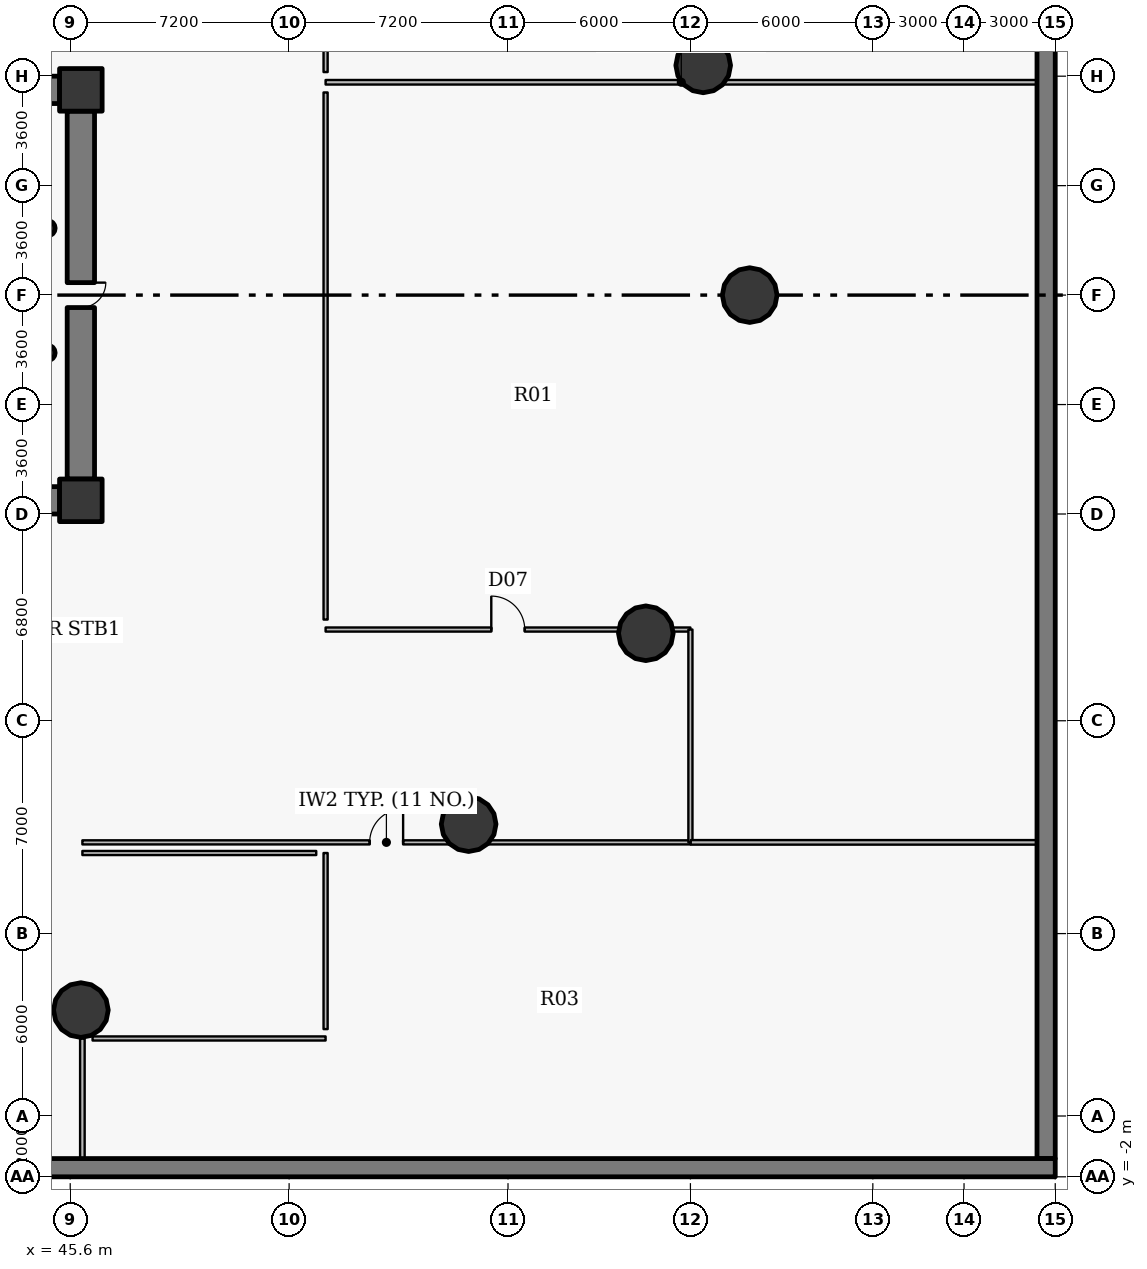
"""IFC4 building model, lengths in metres.
Left out: names, types, materials, properties, quantities, classifications, styles, units other than length and angle.
Written with IfcOpenShell. Run it as: python <this file> out.ifc"""

import sys

from ifc_helpers import new_model, si_unit, direction, frame, frame_2d, origin, origin_2d, place, context, subcontext, project, spatial, rectangle, hollow_circle, extrude, source, transform, mapped, element, fill, save


model = new_model("IFC4")
c1 = context("Model", 3, precision=1e-05, world=origin(), true_north=direction((0.0, 1.0)))
c2 = subcontext(c1, "Body", "Model", "MODEL_VIEW")
j1 = project(units=[si_unit("LENGTHUNIT", "METRE"), si_unit("PLANEANGLEUNIT", "RADIAN")], contexts=[c1])
p1 = place(None, origin())
s1 = spatial("IfcSite", under=j1, at=p1, CompositionType="ELEMENT")
p2 = place(p1, origin())
s2 = spatial("IfcBuilding", under=s1, at=p2, CompositionType="ELEMENT")
p3 = place(p2, frame((0.0, 0.0, -9.0)))
s3 = spatial("IfcBuildingStorey", under=s2, at=p3, CompositionType="ELEMENT", Elevation=-9.0)
p4 = place(p3, frame((77.7, 55.4, 0.0), z_axis=(0.0, 0.0, 1.0), x_axis=(0.0, -1.0, 0.0)))
e1 = element("IfcWall", 1, at=p4, inside=s3, PredefinedType="SHEAR", context=c2, shape_type="SweptSolid", body=[
    extrude(rectangle(XDim=56.8, YDim=0.6, at=frame_2d((28.4, 0.0))), origin(), (0.0, 0.0, 1.0), 4.2),
])
p5 = place(p3, frame((78.0, -1.7, 0.0), z_axis=(0.0, 0.0, 1.0), x_axis=(-1.0, 0.0, 0.0)))
e2 = element("IfcWall", 2, at=p5, inside=s3, PredefinedType="SHEAR", context=c2, shape_type="SweptSolid", body=[
    extrude(rectangle(XDim=84.0, YDim=0.6, at=frame_2d((42.0, 0.0))), origin(), (0.0, 0.0, 1.0), 4.2),
])
for number, where, z_axis, x_axis in (
    (3, (45.95, 20.25, 0.0), (0.0, 0.0, 1.0), (1.0, 0.0, 0.0)),
    (4, (45.95, 33.75, 0.0), (0.0, 0.0, 1.0), (1.0, 0.0, 0.0)),
):
    element("IfcColumn", number, at=place(p3, frame(where, z_axis=z_axis, x_axis=x_axis)), inside=s3, PredefinedType="COLUMN", context=c2, shape_type="SweptSolid", body=[
        extrude(rectangle(XDim=1.4, YDim=1.4, at=origin_2d()), origin(), (0.0, 0.0, 1.0), 4.5),
    ])
p6 = place(p3, frame((26.75, 33.75, 0.0), z_axis=(0.0, 0.0, 1.0), x_axis=(1.0, 0.0, 0.0)))
e5 = element("IfcWall", 5, at=p6, inside=s3, PredefinedType="SHEAR", context=c2, shape_type="SweptSolid", body=[
    extrude(rectangle(XDim=18.5, YDim=0.9, at=frame_2d((9.25, 0.0))), origin(), (0.0, 0.0, 1.0), 3.65),
])
p7 = place(p3, frame((45.95, 33.05, 0.0), z_axis=(0.0, 0.0, 1.0), x_axis=(0.0, -1.0, 0.0)))
e6 = element("IfcWall", 6, at=p7, inside=s3, PredefinedType="SHEAR", context=c2, shape_type="SweptSolid", body=[
    extrude(rectangle(XDim=12.1, YDim=0.9, at=frame_2d((6.05, 0.0))), origin(), (0.0, 0.0, 1.0), 3.65),
])
p8 = place(p7, frame((5.64, 0.0, 0.0)))
e7 = element("IfcOpeningElement", 7, at=p8, cuts=e6, PredefinedType="OPENING", context=c2, shape_type="SweptSolid", body=[
    extrude(rectangle(XDim=0.82, YDim=2.1, at=origin_2d()), frame((0.41, 0.46, 1.05), z_axis=(0.0, -1.0, 0.0), x_axis=(1.0, 0.0, 0.0)), (0.0, 0.0, 1.0), 0.92),
])
p9 = place(p3, frame((45.25, 20.25, 0.0), z_axis=(0.0, 0.0, 1.0), x_axis=(-1.0, 0.0, 0.0)))
e8 = element("IfcWall", 8, at=p9, inside=s3, PredefinedType="SHEAR", context=c2, shape_type="SweptSolid", body=[
    extrude(rectangle(XDim=18.5, YDim=0.9, at=frame_2d((9.25, 0.0))), origin(), (0.0, 0.0, 1.0), 3.65),
])
p10 = place(p9, frame((10.0, 0.0, 0.0)))
e9 = element("IfcOpeningElement", 9, at=p10, cuts=e8, PredefinedType="OPENING", context=c2, shape_type="SweptSolid", body=[
    extrude(rectangle(XDim=1.15, YDim=2.15, at=origin_2d()), frame((0.575, 0.46, 1.075), z_axis=(0.0, -1.0, 0.0), x_axis=(1.0, 0.0, 0.0)), (0.0, 0.0, 1.0), 0.92),
])
for number, where, z_axis, x_axis in (
    (10, (67.95, 27.0, 0.0), (0.0, 0.0, 1.0), (1.0, 0.0, 0.0)),
    (11, (66.42, 34.555, 0.0), (0.0, 0.0, 1.0), (1.0, 0.0, 0.0)),
    (12, (45.951, 3.484, 0.0), (0.0, 0.0, 1.0), (1.0, 0.0, 0.0)),
    (13, (58.705, 9.599, 0.0), (0.0, 0.0, 1.0), (1.0, 0.0, 0.0)),
    (14, (64.534, 15.878, 0.0), (0.0, 0.0, 1.0), (1.0, 0.0, 0.0)),
):
    element("IfcColumn", number, at=place(p3, frame(where, z_axis=z_axis, x_axis=x_axis)), inside=s3, PredefinedType="COLUMN", context=c2, shape_type="SweptSolid", body=[
        extrude(hollow_circle(Radius=0.9, WallThickness=0.05, at=origin_2d()), origin(), (0.0, 0.0, 1.0), 4.5),
    ])
for number, where, z_axis, x_axis in (
    (15, (44.85, 25.1, 0.0), (0.0, 0.0, 1.0), (1.0, 0.0, 0.0)),
    (16, (44.85, 29.2, 0.0), (0.0, 0.0, 1.0), (1.0, 0.0, 0.0)),
):
    element("IfcColumn", number, at=place(p3, frame(where, z_axis=z_axis, x_axis=x_axis)), inside=s3, PredefinedType="COLUMN", context=c2, shape_type="SweptSolid", body=[
        extrude(hollow_circle(Radius=0.254, WallThickness=0.02, at=origin_2d()), origin(), (0.0, 0.0, 1.0), 4.5),
    ])
p11 = place(p3, frame((46.0, -1.4, 0.0), z_axis=(0.0, 0.0, 1.0), x_axis=(0.0, 1.0, 0.0)))
e17 = element("IfcWall", 17, at=p11, inside=s3, PredefinedType="PARTITIONING", context=c2, shape_type="SweptSolid", body=[
    extrude(rectangle(XDim=3.95, YDim=0.15, at=frame_2d((1.975, 0.0))), origin(), (0.0, 0.0, 1.0), 4.2),
])
p12 = place(p3, frame((46.0, 9.0, 0.0), z_axis=(0.0, 0.0, 1.0), x_axis=(1.0, 0.0, 0.0)))
e18 = element("IfcWall", 18, at=p12, inside=s3, PredefinedType="PARTITIONING", context=c2, shape_type="SweptSolid", body=[
    extrude(rectangle(XDim=20.0, YDim=0.135, at=frame_2d((10.0, 0.0))), origin(), (0.0, 0.0, 1.0), 3.385),
])
p13 = place(p12, frame((9.45, 0.0, 0.0)))
e19 = element("IfcOpeningElement", 19, at=p13, cuts=e18, PredefinedType="OPENING", context=c2, shape_type="SweptSolid", body=[
    extrude(rectangle(XDim=1.1, YDim=2.15, at=origin_2d()), frame((0.55, 0.078, 1.075), z_axis=(0.0, -1.0, 0.0), x_axis=(1.0, 0.0, 0.0)), (0.0, 0.0, 1.0), 0.155),
])
p14 = place(p3, frame((54.0, 16.0, 0.0), z_axis=(0.0, 0.0, 1.0), x_axis=(1.0, 0.0, 0.0)))
e20 = element("IfcWall", 20, at=p14, inside=s3, PredefinedType="PARTITIONING", context=c2, shape_type="SweptSolid", body=[
    extrude(rectangle(XDim=12.0, YDim=0.135, at=frame_2d((6.0, 0.0))), origin(), (0.0, 0.0, 1.0), 3.385),
])
p15 = place(p14, frame((5.45, 0.0, 0.0)))
e21 = element("IfcOpeningElement", 21, at=p15, cuts=e20, PredefinedType="OPENING", context=c2, shape_type="SweptSolid", body=[
    extrude(rectangle(XDim=1.1, YDim=2.15, at=origin_2d()), frame((0.55, 0.078, 1.075), z_axis=(0.0, -1.0, 0.0), x_axis=(1.0, 0.0, 0.0)), (0.0, 0.0, 1.0), 0.155),
])
p16 = place(p3, frame((54.0, 34.0, 0.0), z_axis=(0.0, 0.0, 1.0), x_axis=(1.0, 0.0, 0.0)))
e22 = element("IfcWall", 22, at=p16, inside=s3, PredefinedType="PARTITIONING", context=c2, shape_type="SweptSolid", body=[
    extrude(rectangle(XDim=23.4, YDim=0.15, at=frame_2d((11.7, 0.0))), origin(), (0.0, 0.0, 1.0), 3.385),
])
p17 = place(p3, frame((66.0, 9.0, 0.0), z_axis=(0.0, 0.0, 1.0), x_axis=(0.0, 1.0, 0.0)))
e23 = element("IfcWall", 23, at=p17, inside=s3, PredefinedType="PARTITIONING", context=c2, shape_type="SweptSolid", body=[
    extrude(rectangle(XDim=7.0, YDim=0.135, at=frame_2d((3.5, 0.0))), origin(), (0.0, 0.0, 1.0), 3.385),
])
p18 = place(p3, frame((66.01, 9.0, 0.0), z_axis=(0.0, 0.0, 1.0), x_axis=(1.0, 0.0, 0.0)))
e24 = element("IfcWall", 24, at=p18, inside=s3, PredefinedType="PARTITIONING", context=c2, shape_type="SweptSolid", body=[
    extrude(rectangle(XDim=11.39, YDim=0.15, at=frame_2d((5.695, 0.0))), origin(), (0.0, 0.0, 1.0), 4.2),
])
p19 = place(p3, frame((46.335, 2.55, 0.0), z_axis=(0.0, 0.0, 1.0), x_axis=(1.0, 0.0, 0.0)))
e25 = element("IfcWall", 25, at=p19, inside=s3, PredefinedType="PARTITIONING", context=c2, shape_type="SweptSolid", body=[
    extrude(rectangle(XDim=7.665, YDim=0.135, at=frame_2d((3.833, 0.0))), origin(), (0.0, 0.0, 1.0), 3.385),
])
p20 = place(p3, frame((54.0, 2.857, 0.0), z_axis=(0.0, 0.0, 1.0), x_axis=(0.0, 1.0, 0.0)))
e26 = element("IfcWall", 26, at=p20, inside=s3, PredefinedType="PARTITIONING", context=c2, shape_type="SweptSolid", body=[
    extrude(rectangle(XDim=5.792, YDim=0.135, at=frame_2d((2.896, 0.0))), origin(), (0.0, 0.0, 1.0), 4.2),
])
p21 = place(p3, frame((53.692, 8.65, 0.0), z_axis=(0.0, 0.0, 1.0), x_axis=(-1.0, 0.0, 0.0)))
e27 = element("IfcWall", 27, at=p21, inside=s3, PredefinedType="PARTITIONING", context=c2, shape_type="SweptSolid", body=[
    extrude(rectangle(XDim=7.692, YDim=0.135, at=frame_2d((3.846, 0.0))), origin(), (0.0, 0.0, 1.0), 4.2),
])
p22 = place(p3, frame((54.0, 16.327, 0.0), z_axis=(0.0, 0.0, 1.0), x_axis=(0.0, 1.0, 0.0)))
e28 = element("IfcWall", 28, at=p22, inside=s3, PredefinedType="PARTITIONING", context=c2, shape_type="SweptSolid", body=[
    extrude(rectangle(XDim=17.338, YDim=0.135, at=frame_2d((8.669, 0.0))), origin(), (0.0, 0.0, 1.0), 3.385),
])
p23 = place(p3, frame((54.0, 34.335, 0.0), z_axis=(0.0, 0.0, 1.0), x_axis=(0.0, 1.0, 0.0)))
e29 = element("IfcWall", 29, at=p23, inside=s3, PredefinedType="PARTITIONING", context=c2, shape_type="SweptSolid", body=[
    extrude(rectangle(XDim=3.338, YDim=0.135, at=frame_2d((1.669, 0.0))), origin(), (0.0, 0.0, 1.0), 4.2),
])
m1 = source(origin(), c2, "Body", "SweptSolid", [
    extrude(rectangle(XDim=0.82, YDim=2.1, at=origin_2d()), frame((0.41, 0.025, 1.05), z_axis=(0.0, -1.0, 0.0), x_axis=(1.0, 0.0, 0.0)), (0.0, 0.0, 1.0), 0.05),
])
p24 = place(p8, origin())
e30 = element("IfcDoor", 30, at=p24, inside=s3, OperationType="SINGLE_SWING_LEFT", PredefinedType="DOOR", context=c2, shape_type="MappedRepresentation", body=[
    mapped(m1, transform((0.0, 0.0, 0.0), x_axis=(1.0, 0.0, 0.0), y_axis=(0.0, 1.0, 0.0), z_axis=(0.0, 0.0, 1.0), scale=1.0)),
])
fill(e7, e30)
m2 = source(origin(), c2, "Body", "SweptSolid", [
    extrude(rectangle(XDim=1.1, YDim=2.15, at=origin_2d()), frame((0.55, 0.025, 1.075), z_axis=(0.0, -1.0, 0.0), x_axis=(1.0, 0.0, 0.0)), (0.0, 0.0, 1.0), 0.05),
])
p25 = place(p13, origin())
e31 = element("IfcDoor", 31, at=p25, inside=s3, OperationType="SINGLE_SWING_RIGHT", PredefinedType="DOOR", context=c2, shape_type="MappedRepresentation", body=[
    mapped(m2, transform((0.0, 0.0, 0.0), x_axis=(1.0, 0.0, 0.0), y_axis=(0.0, 1.0, 0.0), z_axis=(0.0, 0.0, 1.0), scale=1.0)),
])
fill(e19, e31)
p26 = place(p15, origin())
e32 = element("IfcDoor", 32, at=p26, inside=s3, OperationType="SINGLE_SWING_LEFT", PredefinedType="DOOR", context=c2, shape_type="MappedRepresentation", body=[
    mapped(m2, transform((0.0, 0.0, 0.0), x_axis=(1.0, 0.0, 0.0), y_axis=(0.0, 1.0, 0.0), z_axis=(0.0, 0.0, 1.0), scale=1.0)),
])
fill(e21, e32)
save(model, sys.argv[1])
